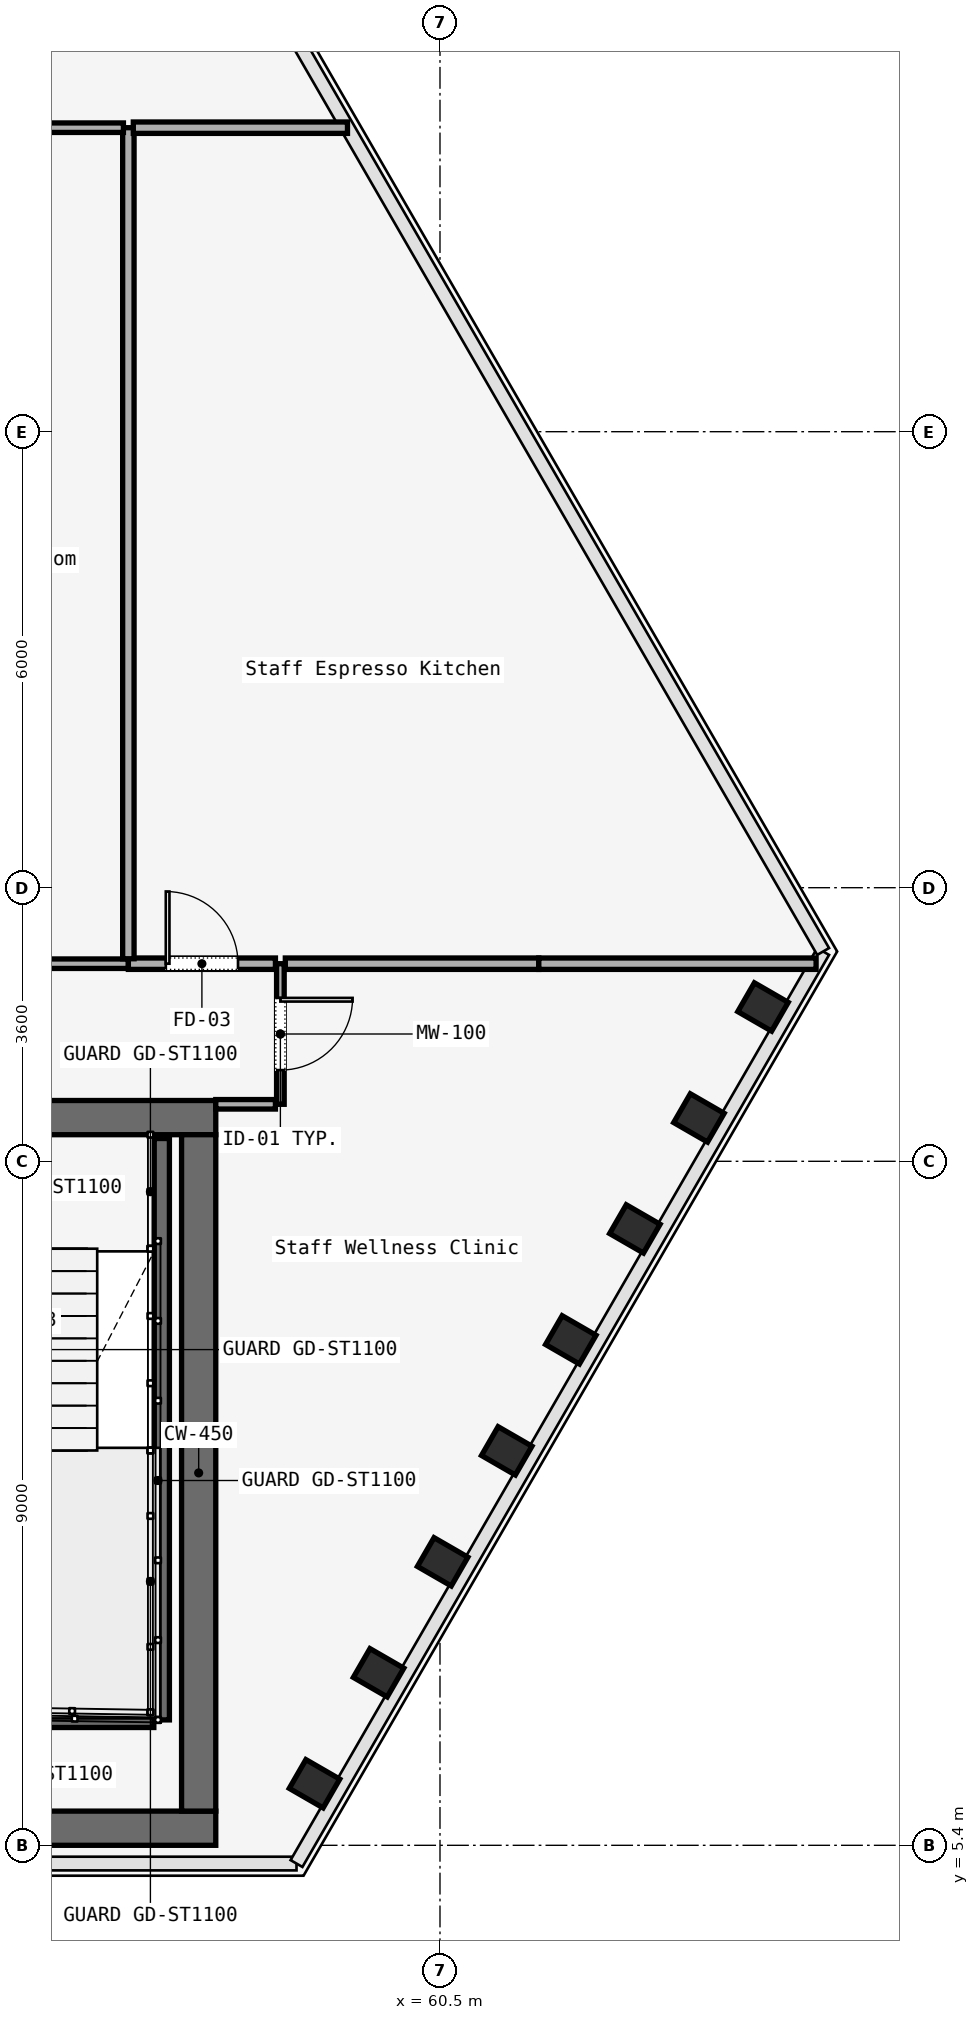
"""IFC4 building model, lengths in metres.
Left out: names, types, materials, properties, quantities, classifications, styles, units other than length and angle.
Written with IfcOpenShell. Run it as: python <this file> out.ifc"""

import sys

from ifc_helpers import new_model, si_unit, direction, frame, frame_2d, origin, origin_2d, place, context, subcontext, project, spatial, rectangle, i_section, extrude, element, fill, save


model = new_model("IFC4")
c1 = context("Model", 3, precision=1e-05, world=origin(), true_north=direction((0.0, 1.0)))
c2 = subcontext(c1, "Body", "Model", "MODEL_VIEW")
j1 = project(units=[si_unit("LENGTHUNIT", "METRE"), si_unit("PLANEANGLEUNIT", "RADIAN")], contexts=[c1])
p1 = place(None, origin())
s1 = spatial("IfcSite", under=j1, at=p1, CompositionType="ELEMENT")
p2 = place(p1, origin())
s2 = spatial("IfcBuilding", under=s1, at=p2, CompositionType="ELEMENT")
p3 = place(p2, frame((0.0, 0.0, 93.0)))
s3 = spatial("IfcBuildingStorey", under=s2, at=p3, CompositionType="ELEMENT", Elevation=93.0)
p4 = place(p3, frame((26.45, 14.975, 0.0), z_axis=(0.0, 0.0, 1.0), x_axis=(1.0, 0.0, 0.0)))
e1 = element("IfcWall", 1, at=p4, inside=s3, PredefinedType="SOLIDWALL", context=c2, shape_type="SweptSolid", body=[
    extrude(rectangle(XDim=31.1, YDim=0.45, at=frame_2d((15.55, 0.0))), origin(), (0.0, 0.0, 1.0), 3.58),
])
p5 = place(p4, frame((1.65, 0.0, 0.0)))
e2 = element("IfcOpeningElement", 2, at=p5, cuts=e1, PredefinedType="OPENING", context=c2, shape_type="SweptSolid", body=[
    extrude(rectangle(XDim=1.1, YDim=2.2, at=frame_2d((0.55, 1.1))), frame((0.0, 0.225, 0.0), z_axis=(0.0, -1.0, 0.0), x_axis=(1.0, 0.0, 0.0)), (0.0, 0.0, 1.0), 0.45),
])
p6 = place(p4, frame((13.65, 0.0, 0.0)))
e3 = element("IfcOpeningElement", 3, at=p6, cuts=e1, PredefinedType="OPENING", context=c2, shape_type="SweptSolid", body=[
    extrude(rectangle(XDim=1.1, YDim=2.2, at=frame_2d((0.55, 1.1))), frame((0.0, 0.225, 0.0), z_axis=(0.0, -1.0, 0.0), x_axis=(1.0, 0.0, 0.0)), (0.0, 0.0, 1.0), 0.45),
])
p7 = place(p4, frame((25.55, 0.0, 0.0)))
e4 = element("IfcOpeningElement", 4, at=p7, cuts=e1, PredefinedType="OPENING", context=c2, shape_type="SweptSolid", body=[
    extrude(rectangle(XDim=1.1, YDim=2.2, at=frame_2d((0.55, 1.1))), frame((0.0, 0.225, 0.0), z_axis=(0.0, -1.0, 0.0), x_axis=(1.0, 0.0, 0.0)), (0.0, 0.0, 1.0), 0.45),
])
p8 = place(p4, frame((10.7, 0.0, 0.0)))
e5 = element("IfcOpeningElement", 5, at=p8, cuts=e1, PredefinedType="OPENING", context=c2, shape_type="SweptSolid", body=[
    extrude(rectangle(XDim=1.4, YDim=2.2, at=frame_2d((0.7, 1.1))), frame((0.0, 0.225, 0.0), z_axis=(0.0, -1.0, 0.0), x_axis=(1.0, 0.0, 0.0)), (0.0, 0.0, 1.0), 0.45),
])
p9 = place(p4, frame((19.35, 0.0, 0.0)))
e6 = element("IfcOpeningElement", 6, at=p9, cuts=e1, PredefinedType="OPENING", context=c2, shape_type="SweptSolid", body=[
    extrude(rectangle(XDim=1.1, YDim=2.2, at=frame_2d((0.55, 1.1))), frame((0.0, 0.225, 0.0), z_axis=(0.0, -1.0, 0.0), x_axis=(1.0, 0.0, 0.0)), (0.0, 0.0, 1.0), 0.45),
])
p10 = place(p4, frame((21.4, 0.0, 0.0)))
e7 = element("IfcOpeningElement", 7, at=p10, cuts=e1, PredefinedType="OPENING", context=c2, shape_type="SweptSolid", body=[
    extrude(rectangle(XDim=0.9, YDim=2.1, at=frame_2d((0.45, 1.05))), frame((0.0, 0.225, 0.0), z_axis=(0.0, -1.0, 0.0), x_axis=(1.0, 0.0, 0.0)), (0.0, 0.0, 1.0), 0.45),
])
p11 = place(p4, frame((23.35, 0.0, 0.0)))
e8 = element("IfcOpeningElement", 8, at=p11, cuts=e1, PredefinedType="OPENING", context=c2, shape_type="SweptSolid", body=[
    extrude(rectangle(XDim=1.3, YDim=2.3, at=frame_2d((0.65, 1.15))), frame((0.0, 0.225, 0.0), z_axis=(0.0, -1.0, 0.0), x_axis=(1.0, 0.0, 0.0)), (0.0, 0.0, 1.0), 0.45),
])
p12 = place(p3, frame((26.45, 5.625, 0.0), z_axis=(0.0, 0.0, 1.0), x_axis=(1.0, 0.0, 0.0)))
e9 = element("IfcWall", 9, at=p12, inside=s3, PredefinedType="SOLIDWALL", context=c2, shape_type="SweptSolid", body=[
    extrude(rectangle(XDim=31.1, YDim=0.45, at=frame_2d((15.55, 0.0))), origin(), (0.0, 0.0, 1.0), 3.58),
])
p13 = place(p3, frame((57.325, 5.85, 0.0), z_axis=(0.0, 0.0, 1.0), x_axis=(0.0, 1.0, 0.0)))
e10 = element("IfcWall", 10, at=p13, inside=s3, PredefinedType="SOLIDWALL", context=c2, shape_type="SweptSolid", body=[
    extrude(rectangle(XDim=8.9, YDim=0.45, at=frame_2d((4.45, 0.0))), origin(), (0.0, 0.0, 1.0), 3.58),
])
for number, where, z_axis, x_axis in (
    (11, (58.849, 6.21, 0.0), (0.0, 0.0, 1.0), (0.5, 0.866, 0.0)),
    (12, (59.692, 7.67, 0.0), (0.0, 0.0, 1.0), (0.5, 0.866, 0.0)),
    (13, (60.535, 9.13, 0.0), (0.0, 0.0, 1.0), (0.5, 0.866, 0.0)),
    (14, (61.378, 10.59, 0.0), (0.0, 0.0, 1.0), (0.5, 0.866, 0.0)),
    (15, (62.221, 12.05, 0.0), (0.0, 0.0, 1.0), (0.5, 0.866, 0.0)),
    (16, (63.064, 13.51, 0.0), (0.0, 0.0, 1.0), (0.5, 0.866, 0.0)),
    (17, (63.907, 14.971, 0.0), (0.0, 0.0, 1.0), (0.5, 0.866, 0.0)),
    (18, (64.75, 16.431, 0.0), (0.0, 0.0, 1.0), (0.5, 0.866, 0.0)),
):
    element("IfcColumn", number, at=place(p3, frame(where, z_axis=z_axis, x_axis=x_axis)), inside=s3, PredefinedType="COLUMN", context=c2, shape_type="SweptSolid", body=[
        extrude(i_section(OverallWidth=0.437, OverallDepth=0.514, WebThickness=0.061, FlangeThickness=0.077, FilletRadius=0.015, at=origin_2d()), origin(), (0.0, 0.0, 1.0), 3.58),
    ])
p14 = place(p3, frame((56.84, 14.7, 0.0), z_axis=(0.0, 0.0, 1.0), x_axis=(0.0, -1.0, 0.0)))
e19 = element("IfcWall", 19, at=p14, inside=s3, PredefinedType="SOLIDWALL", context=c2, shape_type="SweptSolid", body=[
    extrude(rectangle(XDim=7.65, YDim=0.2, at=frame_2d((3.825, 0.0))), origin(), (0.0, 0.0, 1.0), 3.8),
])
p15 = place(p3, frame((53.62, 7.05, 0.0), z_axis=(0.0, 0.0, 1.0), x_axis=(1.0, 0.0, 0.0)))
e20 = element("IfcWall", 20, at=p15, inside=s3, PredefinedType="SOLIDWALL", context=c2, shape_type="SweptSolid", body=[
    extrude(rectangle(XDim=3.115, YDim=0.2, at=frame_2d((1.558, 0.0))), origin(), (0.0, 0.0, 1.0), 3.8),
])
p16 = place(p3, frame((58.4, 17.0, 0.0), z_axis=(0.0, 0.0, 1.0), x_axis=(0.0, -1.0, 0.0)))
e21 = element("IfcWall", 21, at=p16, inside=s3, PredefinedType="MOVABLE", context=c2, shape_type="SweptSolid", body=[
    extrude(rectangle(XDim=1.85, YDim=0.1, at=frame_2d((0.925, 0.0))), origin(), (0.0, 0.0, 1.0), 2.95),
])
p17 = place(p16, frame((0.45, 0.0, 0.0)))
e22 = element("IfcOpeningElement", 22, at=p17, cuts=e21, PredefinedType="OPENING", context=c2, shape_type="SweptSolid", body=[
    extrude(rectangle(XDim=0.95, YDim=2.2, at=frame_2d((0.475, 1.1))), frame((0.0, 0.05, 0.0), z_axis=(0.0, -1.0, 0.0), x_axis=(1.0, 0.0, 0.0)), (0.0, 0.0, 1.0), 0.1),
])
p18 = place(p3, frame((58.335, 15.15, 0.0), z_axis=(0.0, 0.0, 1.0), x_axis=(-1.0, 0.0, 0.0)))
e23 = element("IfcWall", 23, at=p18, inside=s3, PredefinedType="PARTITIONING", context=c2, shape_type="SweptSolid", body=[
    extrude(rectangle(XDim=0.785, YDim=0.125, at=frame_2d((0.393, 0.0))), origin(), (0.0, 0.0, 1.0), 2.95),
])
p19 = place(p3, frame((51.2, 17.0, 0.0), z_axis=(0.0, 0.0, 1.0), x_axis=(1.0, 0.0, 0.0)))
e24 = element("IfcWall", 24, at=p19, inside=s3, PredefinedType="PARTITIONING", context=c2, shape_type="SweptSolid", body=[
    extrude(rectangle(XDim=5.2, YDim=0.125, at=frame_2d((2.6, 0.0))), origin(), (0.0, 0.0, 1.0), 2.95),
])
p20 = place(p19, frame((2.125, 0.0, 0.0)))
e25 = element("IfcOpeningElement", 25, at=p20, cuts=e24, PredefinedType="OPENING", context=c2, shape_type="SweptSolid", body=[
    extrude(rectangle(XDim=0.95, YDim=2.2, at=frame_2d((0.475, 1.1))), frame((0.0, 0.062, 0.0), z_axis=(0.0, -1.0, 0.0), x_axis=(1.0, 0.0, 0.0)), (0.0, 0.0, 1.0), 0.125),
])
p21 = place(p3, frame((56.4, 17.0, 0.0), z_axis=(0.0, 0.0, 1.0), x_axis=(1.0, 0.0, 0.0)))
e26 = element("IfcWall", 26, at=p21, inside=s3, PredefinedType="PARTITIONING", context=c2, shape_type="SweptSolid", body=[
    extrude(rectangle(XDim=1.935, YDim=0.15, at=frame_2d((0.968, 0.0))), origin(), (0.0, 0.0, 1.0), 2.95),
])
p22 = place(p21, frame((0.492, 0.0, 0.0)))
e27 = element("IfcOpeningElement", 27, at=p22, cuts=e26, PredefinedType="OPENING", context=c2, shape_type="SweptSolid", body=[
    extrude(rectangle(XDim=0.95, YDim=2.2, at=frame_2d((0.475, 1.1))), frame((0.0, 0.075, 0.0), z_axis=(0.0, -1.0, 0.0), x_axis=(1.0, 0.0, 0.0)), (0.0, 0.0, 1.0), 0.15),
])
p23 = place(p3, frame((58.465, 17.0, 0.0), z_axis=(0.0, 0.0, 1.0), x_axis=(1.0, 0.0, 0.0)))
e28 = element("IfcWall", 28, at=p23, inside=s3, PredefinedType="PARTITIONING", context=c2, shape_type="SweptSolid", body=[
    extrude(rectangle(XDim=3.335, YDim=0.15, at=frame_2d((1.667, 0.0))), origin(), (0.0, 0.0, 1.0), 2.95),
])
p24 = place(p3, frame((61.8, 17.0, 0.0), z_axis=(0.0, 0.0, 1.0), x_axis=(1.0, 0.0, 0.0)))
e29 = element("IfcWall", 29, at=p24, inside=s3, PredefinedType="PARTITIONING", context=c2, shape_type="SweptSolid", body=[
    extrude(rectangle(XDim=3.648, YDim=0.15, at=frame_2d((1.824, 0.0))), origin(), (0.0, 0.0, 1.0), 2.95),
])
p25 = place(p3, frame((56.4, 17.065, 0.0), z_axis=(0.0, 0.0, 1.0), x_axis=(0.0, 1.0, 0.0)))
e30 = element("IfcWall", 30, at=p25, inside=s3, PredefinedType="PARTITIONING", context=c2, shape_type="SweptSolid", body=[
    extrude(rectangle(XDim=10.935, YDim=0.15, at=frame_2d((5.468, 0.0))), origin(), (0.0, 0.0, 1.0), 2.95),
])
p26 = place(p3, frame((56.465, 28.0, 0.0), z_axis=(0.0, 0.0, 1.0), x_axis=(1.0, 0.0, 0.0)))
e31 = element("IfcWall", 31, at=p26, inside=s3, PredefinedType="PARTITIONING", context=c2, shape_type="SweptSolid", body=[
    extrude(rectangle(XDim=2.818, YDim=0.15, at=frame_2d((1.409, 0.0))), origin(), (0.0, 0.0, 1.0), 2.95),
])
p27 = place(p3, frame((52.2, 28.0, 0.0), z_axis=(0.0, 0.0, 1.0), x_axis=(1.0, 0.0, 0.0)))
e32 = element("IfcWall", 32, at=p27, inside=s3, PredefinedType="PARTITIONING", context=c2, shape_type="SweptSolid", body=[
    extrude(rectangle(XDim=4.135, YDim=0.125, at=frame_2d((2.067, 0.0))), origin(), (0.0, 0.0, 1.0), 2.95),
])
p28 = place(p17, origin())
e33 = element("IfcDoor", 33, at=p28, inside=s3, OperationType="SINGLE_SWING_LEFT", PredefinedType="DOOR", context=c2, shape_type="SweptSolid", body=[
    extrude(rectangle(XDim=0.95, YDim=2.2, at=frame_2d((0.475, 1.1))), frame((0.0, 0.025, 0.0), z_axis=(0.0, -1.0, 0.0), x_axis=(1.0, 0.0, 0.0)), (0.0, 0.0, 1.0), 0.05),
])
fill(e22, e33)
p29 = place(p22, origin())
e34 = element("IfcDoor", 34, at=p29, inside=s3, OperationType="SINGLE_SWING_LEFT", PredefinedType="DOOR", context=c2, shape_type="SweptSolid", body=[
    extrude(rectangle(XDim=0.95, YDim=2.2, at=frame_2d((0.475, 1.1))), frame((0.0, 0.025, 0.0), z_axis=(0.0, -1.0, 0.0), x_axis=(1.0, 0.0, 0.0)), (0.0, 0.0, 1.0), 0.05),
])
fill(e27, e34)
save(model, sys.argv[1])
